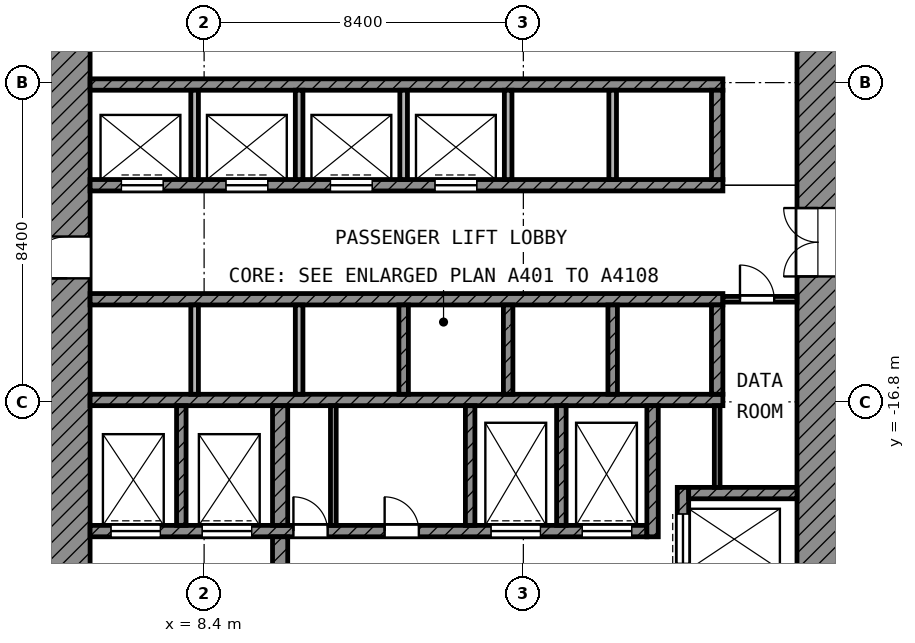
"""IFC4 building model, lengths in metres.
Left out: names, types, materials, properties, quantities, classifications, styles, units other than length and angle.
Written with IfcOpenShell. Run it as: python <this file> out.ifc"""

import sys

from ifc_helpers import new_model, si_unit, direction, frame, frame_2d, origin, place, context, subcontext, project, spatial, rectangle, extrude, element, fill, save


model = new_model("IFC4")
c1 = context("Model", 3, precision=1e-05, world=origin(), true_north=direction((0.0, 1.0)))
c2 = subcontext(c1, "Body", "Model", "MODEL_VIEW")
j1 = project(units=[si_unit("LENGTHUNIT", "METRE"), si_unit("PLANEANGLEUNIT", "RADIAN")], contexts=[c1])
p1 = place(None, origin())
s1 = spatial("IfcSite", under=j1, at=p1, CompositionType="ELEMENT")
p2 = place(p1, origin())
s2 = spatial("IfcBuilding", under=s1, at=p2, CompositionType="ELEMENT")
p3 = place(p2, frame((0.0, 0.0, 64.4)))
s3 = spatial("IfcBuildingStorey", under=s2, at=p3, CompositionType="ELEMENT", Elevation=64.4)
p4 = place(p3, frame((4.8, -25.1, 0.0), z_axis=(0.0, 0.0, 1.0), x_axis=(0.0, 1.0, 0.0)))
e1 = element("IfcWall", 1, at=p4, inside=s3, PredefinedType="SHEAR", context=c2, shape_type="SweptSolid", body=[
    extrude(rectangle(XDim=19.7, YDim=1.2, at=frame_2d((9.85, 0.0))), origin(), (0.0, 0.0, 1.0), 3.9),
])
p5 = place(p4, frame((11.55, 0.0, 0.0)))
e2 = element("IfcOpeningElement", 2, at=p5, cuts=e1, PredefinedType="OPENING", context=c2, shape_type="SweptSolid", body=[
    extrude(rectangle(XDim=1.1, YDim=2.1, at=frame_2d((0.55, 1.05))), frame((0.0, 0.61, 0.0), z_axis=(0.0, -1.0, 0.0), x_axis=(1.0, 0.0, 0.0)), (0.0, 0.0, 1.0), 1.22),
])
p6 = place(p4, frame((2.25, 0.0, 0.0)))
e3 = element("IfcOpeningElement", 3, at=p6, cuts=e1, PredefinedType="OPENING", context=c2, shape_type="SweptSolid", body=[
    extrude(rectangle(XDim=1.1, YDim=2.1, at=frame_2d((0.55, 1.05))), frame((0.0, 0.61, 0.0), z_axis=(0.0, -1.0, 0.0), x_axis=(1.0, 0.0, 0.0)), (0.0, 0.0, 1.0), 1.22),
])
p7 = place(p3, frame((24.55, -24.0, 0.0), z_axis=(0.0, 0.0, 1.0), x_axis=(0.0, 1.0, 0.0)))
e4 = element("IfcWall", 4, at=p7, inside=s3, PredefinedType="SHEAR", context=c2, shape_type="SweptSolid", body=[
    extrude(rectangle(XDim=18.6, YDim=1.1, at=frame_2d((9.3, 0.0))), origin(), (0.0, 0.0, 1.0), 3.9),
])
p8 = place(p7, frame((10.5, 0.0, 0.0)))
e5 = element("IfcOpeningElement", 5, at=p8, cuts=e4, PredefinedType="OPENING", context=c2, shape_type="SweptSolid", body=[
    extrude(rectangle(XDim=1.8, YDim=2.1, at=frame_2d((0.9, 1.05))), frame((0.0, 0.56, 0.0), z_axis=(0.0, -1.0, 0.0), x_axis=(1.0, 0.0, 0.0)), (0.0, 0.0, 1.0), 1.12),
])
p9 = place(p3, frame((5.4, -8.45, 0.0), z_axis=(0.0, 0.0, 1.0), x_axis=(1.0, 0.0, 0.0)))
e6 = element("IfcWall", 6, at=p9, inside=s3, PredefinedType="SHEAR", context=c2, shape_type="SweptSolid", body=[
    extrude(rectangle(XDim=16.65, YDim=0.3, at=frame_2d((8.325, 0.0))), origin(), (0.0, 0.0, 1.0), 3.9),
])
p10 = place(p3, frame((5.4, -11.1, 0.0), z_axis=(0.0, 0.0, 1.0), x_axis=(1.0, 0.0, 0.0)))
e7 = element("IfcWall", 7, at=p10, inside=s3, PredefinedType="SHEAR", context=c2, shape_type="SweptSolid", body=[
    extrude(rectangle(XDim=16.65, YDim=0.3, at=frame_2d((8.325, 0.0))), origin(), (0.0, 0.0, 1.0), 3.9),
])
p11 = place(p10, frame((0.825, 0.0, 0.0)))
e8 = element("IfcOpeningElement", 8, at=p11, cuts=e7, PredefinedType="OPENING", context=c2, shape_type="SweptSolid", body=[
    extrude(rectangle(XDim=1.1, YDim=2.1, at=frame_2d((0.55, 1.05))), frame((0.0, 0.16, 0.0), z_axis=(0.0, -1.0, 0.0), x_axis=(1.0, 0.0, 0.0)), (0.0, 0.0, 1.0), 0.32),
])
p12 = place(p10, frame((3.575, 0.0, 0.0)))
e9 = element("IfcOpeningElement", 9, at=p12, cuts=e7, PredefinedType="OPENING", context=c2, shape_type="SweptSolid", body=[
    extrude(rectangle(XDim=1.1, YDim=2.1, at=frame_2d((0.55, 1.05))), frame((0.0, 0.16, 0.0), z_axis=(0.0, -1.0, 0.0), x_axis=(1.0, 0.0, 0.0)), (0.0, 0.0, 1.0), 0.32),
])
p13 = place(p10, frame((6.325, 0.0, 0.0)))
e10 = element("IfcOpeningElement", 10, at=p13, cuts=e7, PredefinedType="OPENING", context=c2, shape_type="SweptSolid", body=[
    extrude(rectangle(XDim=1.1, YDim=2.1, at=frame_2d((0.55, 1.05))), frame((0.0, 0.16, 0.0), z_axis=(0.0, -1.0, 0.0), x_axis=(1.0, 0.0, 0.0)), (0.0, 0.0, 1.0), 0.32),
])
p14 = place(p10, frame((9.075, 0.0, 0.0)))
e11 = element("IfcOpeningElement", 11, at=p14, cuts=e7, PredefinedType="OPENING", context=c2, shape_type="SweptSolid", body=[
    extrude(rectangle(XDim=1.1, YDim=2.1, at=frame_2d((0.55, 1.05))), frame((0.0, 0.16, 0.0), z_axis=(0.0, -1.0, 0.0), x_axis=(1.0, 0.0, 0.0)), (0.0, 0.0, 1.0), 0.32),
])
for number, where, z_axis, x_axis in (
    (12, (5.4, -14.1, 0.0), (0.0, 0.0, 1.0), (1.0, 0.0, 0.0)),
    (13, (5.4, -16.75, 0.0), (0.0, 0.0, 1.0), (1.0, 0.0, 0.0)),
):
    element("IfcWall", number, at=place(p3, frame(where, z_axis=z_axis, x_axis=x_axis)), inside=s3, PredefinedType="SHEAR", context=c2, shape_type="SweptSolid", body=[
        extrude(rectangle(XDim=16.65, YDim=0.3, at=frame_2d((8.325, 0.0))), origin(), (0.0, 0.0, 1.0), 3.9),
    ])
p15 = place(p3, frame((5.4, -20.2, 0.0), z_axis=(0.0, 0.0, 1.0), x_axis=(1.0, 0.0, 0.0)))
e14 = element("IfcWall", 14, at=p15, inside=s3, PredefinedType="SHEAR", context=c2, shape_type="SweptSolid", body=[
    extrude(rectangle(XDim=14.65, YDim=0.3, at=frame_2d((7.325, 0.0))), origin(), (0.0, 0.0, 1.0), 3.9),
])
p16 = place(p15, frame((10.55, 0.0, 0.0)))
e15 = element("IfcOpeningElement", 15, at=p16, cuts=e14, PredefinedType="OPENING", context=c2, shape_type="SweptSolid", body=[
    extrude(rectangle(XDim=1.3, YDim=2.1, at=frame_2d((0.65, 1.05))), frame((0.0, 0.16, 0.0), z_axis=(0.0, -1.0, 0.0), x_axis=(1.0, 0.0, 0.0)), (0.0, 0.0, 1.0), 0.32),
])
p17 = place(p15, frame((12.95, 0.0, 0.0)))
e16 = element("IfcOpeningElement", 16, at=p17, cuts=e14, PredefinedType="OPENING", context=c2, shape_type="SweptSolid", body=[
    extrude(rectangle(XDim=1.3, YDim=2.1, at=frame_2d((0.65, 1.05))), frame((0.0, 0.16, 0.0), z_axis=(0.0, -1.0, 0.0), x_axis=(1.0, 0.0, 0.0)), (0.0, 0.0, 1.0), 0.32),
])
p18 = place(p15, frame((0.55, 0.0, 0.0)))
e17 = element("IfcOpeningElement", 17, at=p18, cuts=e14, PredefinedType="OPENING", context=c2, shape_type="SweptSolid", body=[
    extrude(rectangle(XDim=1.3, YDim=2.1, at=frame_2d((0.65, 1.05))), frame((0.0, 0.16, 0.0), z_axis=(0.0, -1.0, 0.0), x_axis=(1.0, 0.0, 0.0)), (0.0, 0.0, 1.0), 0.32),
])
p19 = place(p15, frame((2.95, 0.0, 0.0)))
e18 = element("IfcOpeningElement", 18, at=p19, cuts=e14, PredefinedType="OPENING", context=c2, shape_type="SweptSolid", body=[
    extrude(rectangle(XDim=1.3, YDim=2.1, at=frame_2d((0.65, 1.05))), frame((0.0, 0.16, 0.0), z_axis=(0.0, -1.0, 0.0), x_axis=(1.0, 0.0, 0.0)), (0.0, 0.0, 1.0), 0.32),
])
p20 = place(p15, frame((5.35, 0.0, 0.0)))
e19 = element("IfcOpeningElement", 19, at=p20, cuts=e14, PredefinedType="OPENING", context=c2, shape_type="SweptSolid", body=[
    extrude(rectangle(XDim=0.9, YDim=2.1, at=frame_2d((0.45, 1.05))), frame((0.0, 0.16, 0.0), z_axis=(0.0, -1.0, 0.0), x_axis=(1.0, 0.0, 0.0)), (0.0, 0.0, 1.0), 0.32),
])
p21 = place(p15, frame((7.75, 0.0, 0.0)))
e20 = element("IfcOpeningElement", 20, at=p21, cuts=e14, PredefinedType="OPENING", context=c2, shape_type="SweptSolid", body=[
    extrude(rectangle(XDim=0.9, YDim=2.1, at=frame_2d((0.45, 1.05))), frame((0.0, 0.16, 0.0), z_axis=(0.0, -1.0, 0.0), x_axis=(1.0, 0.0, 0.0)), (0.0, 0.0, 1.0), 0.32),
])
p22 = place(p3, frame((10.4, -24.0, 0.0), z_axis=(0.0, 0.0, 1.0), x_axis=(0.0, 1.0, 0.0)))
e21 = element("IfcWall", 21, at=p22, inside=s3, PredefinedType="SHEAR", context=c2, shape_type="SweptSolid", body=[
    extrude(rectangle(XDim=3.65, YDim=0.4, at=frame_2d((1.825, 0.0))), origin(), (0.0, 0.0, 1.0), 3.9),
])
p23 = place(p22, frame((1.35, 0.0, 0.0)))
e22 = element("IfcOpeningElement", 22, at=p23, cuts=e21, PredefinedType="OPENING", context=c2, shape_type="SweptSolid", body=[
    extrude(rectangle(XDim=1.1, YDim=2.1, at=frame_2d((0.55, 1.05))), frame((0.0, 0.21, 0.0), z_axis=(0.0, -1.0, 0.0), x_axis=(1.0, 0.0, 0.0)), (0.0, 0.0, 1.0), 0.42),
])
p24 = place(p3, frame((10.4, -20.05, 0.0), z_axis=(0.0, 0.0, 1.0), x_axis=(0.0, 1.0, 0.0)))
e23 = element("IfcWall", 23, at=p24, inside=s3, PredefinedType="SHEAR", context=c2, shape_type="SweptSolid", body=[
    extrude(rectangle(XDim=3.15, YDim=0.4, at=frame_2d((1.575, 0.0))), origin(), (0.0, 0.0, 1.0), 3.9),
])
p25 = place(p3, frame((20.2, -20.35, 0.0), z_axis=(0.0, 0.0, 1.0), x_axis=(0.0, 1.0, 0.0)))
e24 = element("IfcWall", 24, at=p25, inside=s3, PredefinedType="SHEAR", context=c2, shape_type="SweptSolid", body=[
    extrude(rectangle(XDim=3.45, YDim=0.3, at=frame_2d((1.725, 0.0))), origin(), (0.0, 0.0, 1.0), 3.9),
])
p26 = place(p3, frame((21.9, -10.95, 0.0), z_axis=(0.0, 0.0, 1.0), x_axis=(0.0, 1.0, 0.0)))
e25 = element("IfcWall", 25, at=p26, inside=s3, PredefinedType="SHEAR", context=c2, shape_type="SweptSolid", body=[
    extrude(rectangle(XDim=2.35, YDim=0.3, at=frame_2d((1.175, 0.0))), origin(), (0.0, 0.0, 1.0), 3.9),
])
p27 = place(p3, frame((21.9, -16.6, 0.0), z_axis=(0.0, 0.0, 1.0), x_axis=(0.0, 1.0, 0.0)))
e26 = element("IfcWall", 26, at=p27, inside=s3, PredefinedType="SHEAR", context=c2, shape_type="SweptSolid", body=[
    extrude(rectangle(XDim=2.35, YDim=0.3, at=frame_2d((1.175, 0.0))), origin(), (0.0, 0.0, 1.0), 3.9),
])
p28 = place(p3, frame((21.15, -19.2, 0.0), z_axis=(0.0, 0.0, 1.0), x_axis=(1.0, 0.0, 0.0)))
e27 = element("IfcWall", 27, at=p28, inside=s3, PredefinedType="SHEAR", context=c2, shape_type="SweptSolid", body=[
    extrude(rectangle(XDim=2.85, YDim=0.3, at=frame_2d((1.425, 0.0))), origin(), (0.0, 0.0, 1.0), 3.9),
])
p29 = place(p3, frame((21.0, -24.0, 0.0), z_axis=(0.0, 0.0, 1.0), x_axis=(0.0, 1.0, 0.0)))
e28 = element("IfcWall", 28, at=p29, inside=s3, PredefinedType="SHEAR", context=c2, shape_type="SweptSolid", body=[
    extrude(rectangle(XDim=4.95, YDim=0.3, at=frame_2d((2.475, 0.0))), origin(), (0.0, 0.0, 1.0), 3.9),
])
p30 = place(p29, frame((2.95, 0.0, 0.0)))
e29 = element("IfcOpeningElement", 29, at=p30, cuts=e28, PredefinedType="OPENING", context=c2, shape_type="SweptSolid", body=[
    extrude(rectangle(XDim=1.3, YDim=2.1, at=frame_2d((0.65, 1.05))), frame((0.0, 0.16, 0.0), z_axis=(0.0, -1.0, 0.0), x_axis=(1.0, 0.0, 0.0)), (0.0, 0.0, 1.0), 0.32),
])
p31 = place(p29, frame((0.55, 0.0, 0.0)))
e30 = element("IfcOpeningElement", 30, at=p31, cuts=e28, PredefinedType="OPENING", context=c2, shape_type="SweptSolid", body=[
    extrude(rectangle(XDim=1.3, YDim=2.1, at=frame_2d((0.65, 1.05))), frame((0.0, 0.16, 0.0), z_axis=(0.0, -1.0, 0.0), x_axis=(1.0, 0.0, 0.0)), (0.0, 0.0, 1.0), 0.32),
])
for number, where, z_axis, x_axis in (
    (31, (7.8, -20.05, 0.0), (0.0, 0.0, 1.0), (0.0, 1.0, 0.0)),
    (32, (15.4, -20.05, 0.0), (0.0, 0.0, 1.0), (0.0, 1.0, 0.0)),
    (33, (17.8, -20.05, 0.0), (0.0, 0.0, 1.0), (0.0, 1.0, 0.0)),
):
    element("IfcWall", number, at=place(p3, frame(where, z_axis=z_axis, x_axis=x_axis)), inside=s3, PredefinedType="SHEAR", context=c2, shape_type="SweptSolid", body=[
        extrude(rectangle(XDim=3.15, YDim=0.25, at=frame_2d((1.575, 0.0))), origin(), (0.0, 0.0, 1.0), 3.9),
    ])
for number, where, z_axis, x_axis in (
    (34, (8.15, -10.95, 0.0), (0.0, 0.0, 1.0), (0.0, 1.0, 0.0)),
    (35, (10.9, -10.95, 0.0), (0.0, 0.0, 1.0), (0.0, 1.0, 0.0)),
    (36, (13.65, -10.95, 0.0), (0.0, 0.0, 1.0), (0.0, 1.0, 0.0)),
    (37, (16.4, -10.95, 0.0), (0.0, 0.0, 1.0), (0.0, 1.0, 0.0)),
    (38, (19.15, -10.95, 0.0), (0.0, 0.0, 1.0), (0.0, 1.0, 0.0)),
):
    element("IfcWall", number, at=place(p3, frame(where, z_axis=z_axis, x_axis=x_axis)), inside=s3, PredefinedType="PARTITIONING", context=c2, shape_type="SweptSolid", body=[
        extrude(rectangle(XDim=2.35, YDim=0.2, at=frame_2d((1.175, 0.0))), origin(), (0.0, 0.0, 1.0), 3.9),
    ])
for number, where, z_axis, x_axis in (
    (39, (8.15, -16.6, 0.0), (0.0, 0.0, 1.0), (0.0, 1.0, 0.0)),
    (40, (10.9, -16.6, 0.0), (0.0, 0.0, 1.0), (0.0, 1.0, 0.0)),
):
    element("IfcWall", number, at=place(p3, frame(where, z_axis=z_axis, x_axis=x_axis)), inside=s3, PredefinedType="PARTITIONING", context=c2, shape_type="SweptSolid", body=[
        extrude(rectangle(XDim=2.35, YDim=0.2, at=frame_2d((1.175, 0.0))), origin(), (0.0, 0.0, 1.0), 3.9),
    ])
for number, where, z_axis, x_axis in (
    (41, (13.65, -16.6, 0.0), (0.0, 0.0, 1.0), (0.0, 1.0, 0.0)),
    (42, (16.4, -16.6, 0.0), (0.0, 0.0, 1.0), (0.0, 1.0, 0.0)),
    (43, (19.15, -16.6, 0.0), (0.0, 0.0, 1.0), (0.0, 1.0, 0.0)),
):
    element("IfcWall", number, at=place(p3, frame(where, z_axis=z_axis, x_axis=x_axis)), inside=s3, PredefinedType="SHEAR", context=c2, shape_type="SweptSolid", body=[
        extrude(rectangle(XDim=2.35, YDim=0.25, at=frame_2d((1.175, 0.0))), origin(), (0.0, 0.0, 1.0), 3.9),
    ])
p32 = place(p3, frame((21.9, -19.05, 0.0), z_axis=(0.0, 0.0, 1.0), x_axis=(0.0, 1.0, 0.0)))
e44 = element("IfcWall", 44, at=p32, inside=s3, PredefinedType="PARTITIONING", context=c2, shape_type="SweptSolid", body=[
    extrude(rectangle(XDim=2.15, YDim=0.15, at=frame_2d((1.075, 0.0))), origin(), (0.0, 0.0, 1.0), 3.9),
])
p33 = place(p3, frame((22.05, -14.1, 0.0), z_axis=(0.0, 0.0, 1.0), x_axis=(1.0, 0.0, 0.0)))
e45 = element("IfcWall", 45, at=p33, inside=s3, PredefinedType="PARTITIONING", context=c2, shape_type="SweptSolid", body=[
    extrude(rectangle(XDim=1.95, YDim=0.15, at=frame_2d((0.975, 0.0))), origin(), (0.0, 0.0, 1.0), 3.9),
])
p34 = place(p33, frame((0.45, 0.0, 0.0)))
e46 = element("IfcOpeningElement", 46, at=p34, cuts=e45, PredefinedType="OPENING", context=c2, shape_type="SweptSolid", body=[
    extrude(rectangle(XDim=0.9, YDim=2.1, at=frame_2d((0.45, 1.05))), frame((0.0, 0.085, 0.0), z_axis=(0.0, -1.0, 0.0), x_axis=(1.0, 0.0, 0.0)), (0.0, 0.0, 1.0), 0.17),
])
p35 = place(p3, frame((11.8, -20.05, 0.0), z_axis=(0.0, 0.0, 1.0), x_axis=(0.0, 1.0, 0.0)))
e47 = element("IfcWall", 47, at=p35, inside=s3, PredefinedType="PARTITIONING", context=c2, shape_type="SweptSolid", body=[
    extrude(rectangle(XDim=3.15, YDim=0.15, at=frame_2d((1.575, 0.0))), origin(), (0.0, 0.0, 1.0), 3.9),
])
p36 = place(p11, origin())
e48 = element("IfcDoor", 48, at=p36, inside=s3, OperationType="DOUBLE_DOOR_SLIDING", PredefinedType="DOOR", context=c2, shape_type="SweptSolid", body=[
    extrude(rectangle(XDim=1.1, YDim=2.1, at=frame_2d((0.55, 1.05))), frame((0.0, 0.025, 0.0), z_axis=(0.0, -1.0, 0.0), x_axis=(1.0, 0.0, 0.0)), (0.0, 0.0, 1.0), 0.05),
])
fill(e8, e48)
p37 = place(p12, origin())
e49 = element("IfcDoor", 49, at=p37, inside=s3, OperationType="DOUBLE_DOOR_SLIDING", PredefinedType="DOOR", context=c2, shape_type="SweptSolid", body=[
    extrude(rectangle(XDim=1.1, YDim=2.1, at=frame_2d((0.55, 1.05))), frame((0.0, 0.025, 0.0), z_axis=(0.0, -1.0, 0.0), x_axis=(1.0, 0.0, 0.0)), (0.0, 0.0, 1.0), 0.05),
])
fill(e9, e49)
p38 = place(p13, origin())
e50 = element("IfcDoor", 50, at=p38, inside=s3, OperationType="DOUBLE_DOOR_SLIDING", PredefinedType="DOOR", context=c2, shape_type="SweptSolid", body=[
    extrude(rectangle(XDim=1.1, YDim=2.1, at=frame_2d((0.55, 1.05))), frame((0.0, 0.025, 0.0), z_axis=(0.0, -1.0, 0.0), x_axis=(1.0, 0.0, 0.0)), (0.0, 0.0, 1.0), 0.05),
])
fill(e10, e50)
p39 = place(p14, origin())
e51 = element("IfcDoor", 51, at=p39, inside=s3, OperationType="DOUBLE_DOOR_SLIDING", PredefinedType="DOOR", context=c2, shape_type="SweptSolid", body=[
    extrude(rectangle(XDim=1.1, YDim=2.1, at=frame_2d((0.55, 1.05))), frame((0.0, 0.025, 0.0), z_axis=(0.0, -1.0, 0.0), x_axis=(1.0, 0.0, 0.0)), (0.0, 0.0, 1.0), 0.05),
])
fill(e11, e51)
p40 = place(p30, origin())
e52 = element("IfcDoor", 52, at=p40, inside=s3, OperationType="DOUBLE_DOOR_SLIDING", PredefinedType="DOOR", context=c2, shape_type="SweptSolid", body=[
    extrude(rectangle(XDim=1.3, YDim=2.1, at=frame_2d((0.65, 1.05))), frame((0.0, 0.025, 0.0), z_axis=(0.0, -1.0, 0.0), x_axis=(1.0, 0.0, 0.0)), (0.0, 0.0, 1.0), 0.05),
])
fill(e29, e52)
p41 = place(p16, origin())
e53 = element("IfcDoor", 53, at=p41, inside=s3, OperationType="DOUBLE_DOOR_SLIDING", PredefinedType="DOOR", context=c2, shape_type="SweptSolid", body=[
    extrude(rectangle(XDim=1.3, YDim=2.1, at=frame_2d((0.65, 1.05))), frame((0.0, 0.025, 0.0), z_axis=(0.0, -1.0, 0.0), x_axis=(1.0, 0.0, 0.0)), (0.0, 0.0, 1.0), 0.05),
])
fill(e15, e53)
p42 = place(p17, origin())
e54 = element("IfcDoor", 54, at=p42, inside=s3, OperationType="DOUBLE_DOOR_SLIDING", PredefinedType="DOOR", context=c2, shape_type="SweptSolid", body=[
    extrude(rectangle(XDim=1.3, YDim=2.1, at=frame_2d((0.65, 1.05))), frame((0.0, 0.025, 0.0), z_axis=(0.0, -1.0, 0.0), x_axis=(1.0, 0.0, 0.0)), (0.0, 0.0, 1.0), 0.05),
])
fill(e16, e54)
p43 = place(p18, origin())
e55 = element("IfcDoor", 55, at=p43, inside=s3, OperationType="DOUBLE_DOOR_SLIDING", PredefinedType="DOOR", context=c2, shape_type="SweptSolid", body=[
    extrude(rectangle(XDim=1.3, YDim=2.1, at=frame_2d((0.65, 1.05))), frame((0.0, 0.025, 0.0), z_axis=(0.0, -1.0, 0.0), x_axis=(1.0, 0.0, 0.0)), (0.0, 0.0, 1.0), 0.05),
])
fill(e17, e55)
p44 = place(p19, origin())
e56 = element("IfcDoor", 56, at=p44, inside=s3, OperationType="DOUBLE_DOOR_SLIDING", PredefinedType="DOOR", context=c2, shape_type="SweptSolid", body=[
    extrude(rectangle(XDim=1.3, YDim=2.1, at=frame_2d((0.65, 1.05))), frame((0.0, 0.025, 0.0), z_axis=(0.0, -1.0, 0.0), x_axis=(1.0, 0.0, 0.0)), (0.0, 0.0, 1.0), 0.05),
])
fill(e18, e56)
p45 = place(p5, origin())
e57 = element("IfcDoor", 57, at=p45, inside=s3, OperationType="SINGLE_SWING_LEFT", PredefinedType="DOOR", context=c2, shape_type="SweptSolid", body=[
    extrude(rectangle(XDim=1.1, YDim=2.1, at=frame_2d((0.55, 1.05))), frame((0.0, 0.025, 0.0), z_axis=(0.0, -1.0, 0.0), x_axis=(1.0, 0.0, 0.0)), (0.0, 0.0, 1.0), 0.05),
])
fill(e2, e57)
p46 = place(p8, origin())
e58 = element("IfcDoor", 58, at=p46, inside=s3, OperationType="DOUBLE_DOOR_SINGLE_SWING", PredefinedType="DOOR", context=c2, shape_type="SweptSolid", body=[
    extrude(rectangle(XDim=1.8, YDim=2.1, at=frame_2d((0.9, 1.05))), frame((0.0, 0.025, 0.0), z_axis=(0.0, -1.0, 0.0), x_axis=(1.0, 0.0, 0.0)), (0.0, 0.0, 1.0), 0.05),
])
fill(e5, e58)
p47 = place(p34, origin())
e59 = element("IfcDoor", 59, at=p47, inside=s3, OperationType="SINGLE_SWING_LEFT", PredefinedType="DOOR", context=c2, shape_type="SweptSolid", body=[
    extrude(rectangle(XDim=0.9, YDim=2.1, at=frame_2d((0.45, 1.05))), frame((0.0, 0.025, 0.0), z_axis=(0.0, -1.0, 0.0), x_axis=(1.0, 0.0, 0.0)), (0.0, 0.0, 1.0), 0.05),
])
fill(e46, e59)
p48 = place(p20, origin())
e60 = element("IfcDoor", 60, at=p48, inside=s3, OperationType="SINGLE_SWING_LEFT", PredefinedType="DOOR", context=c2, shape_type="SweptSolid", body=[
    extrude(rectangle(XDim=0.9, YDim=2.1, at=frame_2d((0.45, 1.05))), frame((0.0, 0.025, 0.0), z_axis=(0.0, -1.0, 0.0), x_axis=(1.0, 0.0, 0.0)), (0.0, 0.0, 1.0), 0.05),
])
fill(e19, e60)
p49 = place(p21, origin())
e61 = element("IfcDoor", 61, at=p49, inside=s3, OperationType="SINGLE_SWING_LEFT", PredefinedType="DOOR", context=c2, shape_type="SweptSolid", body=[
    extrude(rectangle(XDim=0.9, YDim=2.1, at=frame_2d((0.45, 1.05))), frame((0.0, 0.025, 0.0), z_axis=(0.0, -1.0, 0.0), x_axis=(1.0, 0.0, 0.0)), (0.0, 0.0, 1.0), 0.05),
])
fill(e20, e61)
save(model, sys.argv[1])
